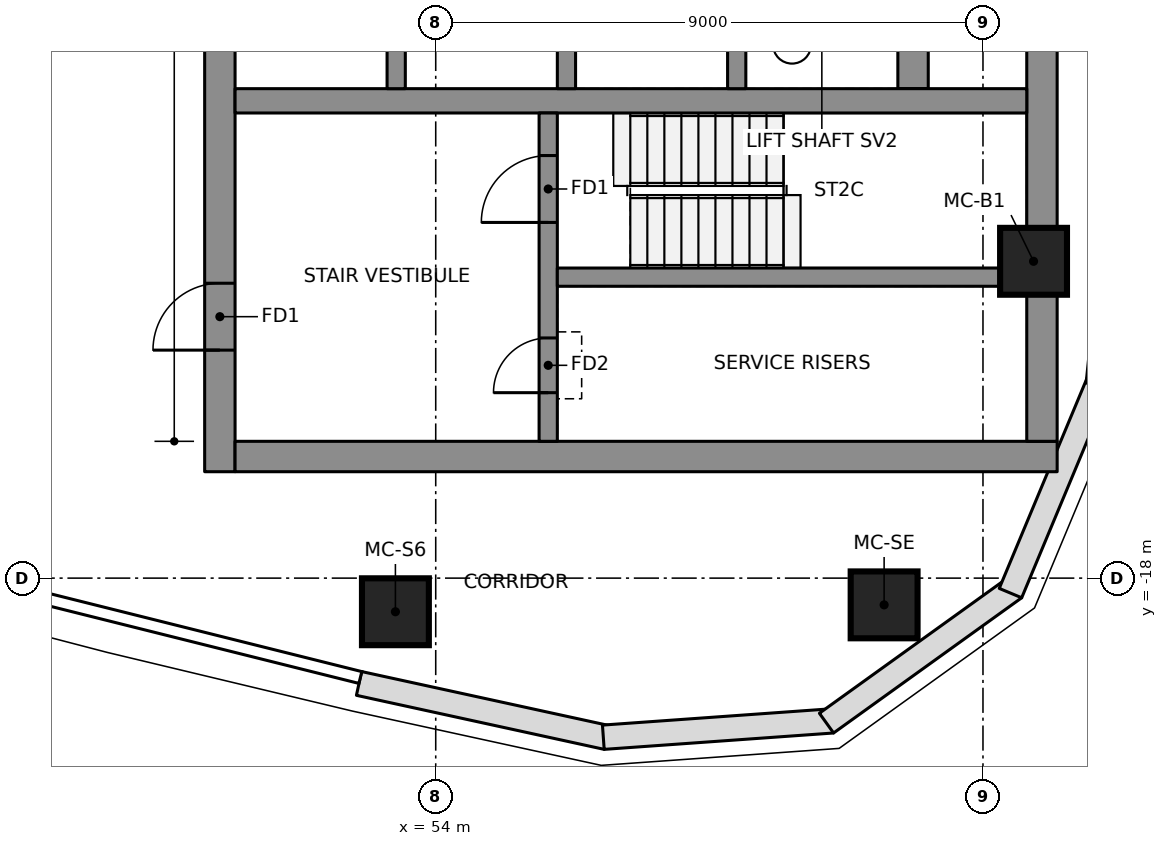
"""IFC4 building model, lengths in metres.
Left out: names, types, materials, properties, quantities, classifications, styles, units other than length and angle.
Written with IfcOpenShell. Run it as: python <this file> out.ifc"""

import sys

from ifc_helpers import new_model, si_unit, direction, frame, frame_2d, origin, origin_2d, place, context, subcontext, project, spatial, polyline, rectangle, outline, extrude, element, fill, save


model = new_model("IFC4")
c1 = context("Model", 3, precision=1e-05, world=origin(), true_north=direction((0.0, 1.0)))
c2 = subcontext(c1, "Body", "Model", "MODEL_VIEW")
j1 = project(units=[si_unit("LENGTHUNIT", "METRE"), si_unit("PLANEANGLEUNIT", "RADIAN")], contexts=[c1])
p1 = place(None, origin())
s1 = spatial("IfcSite", under=j1, at=p1, CompositionType="ELEMENT")
p2 = place(p1, origin())
s2 = spatial("IfcBuilding", under=s1, at=p2, CompositionType="ELEMENT")
p3 = place(p2, frame((0.0, 0.0, 282.1)))
s3 = spatial("IfcBuildingStorey", under=s2, at=p3, CompositionType="ELEMENT", Elevation=282.1)
p4 = place(p3, frame((50.45, -16.25, 0.0), z_axis=(0.0, 0.0, 1.0), x_axis=(0.0, 1.0, 0.0)))
e1 = element("IfcWall", 1, at=p4, inside=s3, PredefinedType="SHEAR", context=c2, shape_type="SweptSolid", body=[
    extrude(rectangle(XDim=9.6, YDim=0.5, at=frame_2d((4.8, 0.0))), origin(), (0.0, 0.0, 1.0), 3.55),
])
p5 = place(p4, frame((2.0, 0.0, 0.0)))
e2 = element("IfcOpeningElement", 2, at=p5, cuts=e1, PredefinedType="OPENING", context=c2, shape_type="SweptSolid", body=[
    extrude(rectangle(XDim=1.1, YDim=2.1, at=frame_2d((0.55, 1.05))), frame((0.0, 0.26, 0.0), z_axis=(0.0, -1.0, 0.0), x_axis=(1.0, 0.0, 0.0)), (0.0, 0.0, 1.0), 0.52),
])
p6 = place(p3, frame((50.7, -16.0, 0.0), z_axis=(0.0, 0.0, 1.0), x_axis=(1.0, 0.0, 0.0)))
e3 = element("IfcWall", 3, at=p6, inside=s3, PredefinedType="SHEAR", context=c2, shape_type="SweptSolid", body=[
    extrude(rectangle(XDim=13.52, YDim=0.5, at=frame_2d((6.76, 0.0))), origin(), (0.0, 0.0, 1.0), 3.55),
])
p7 = place(p3, frame((63.97, -15.75, 0.0), z_axis=(0.0, 0.0, 1.0), x_axis=(0.0, 1.0, 0.0)))
e4 = element("IfcWall", 4, at=p7, inside=s3, PredefinedType="SHEAR", context=c2, shape_type="SweptSolid", body=[
    extrude(rectangle(XDim=8.847, YDim=0.5, at=frame_2d((4.423, 0.0))), origin(), (0.0, 0.0, 1.0), 3.55),
])
p8 = place(p3, frame((61.85, -9.95, 0.0), z_axis=(0.0, 0.0, 1.0), x_axis=(0.0, 1.0, 0.0)))
e5 = element("IfcWall", 5, at=p8, inside=s3, PredefinedType="SHEAR", context=c2, shape_type="SweptSolid", body=[
    extrude(rectangle(XDim=19.9, YDim=0.5, at=frame_2d((9.95, 0.0))), origin(), (0.0, 0.0, 1.0), 3.55),
])
p9 = place(p3, frame((50.7, -10.15, 0.0), z_axis=(0.0, 0.0, 1.0), x_axis=(1.0, 0.0, 0.0)))
e6 = element("IfcWall", 6, at=p9, inside=s3, PredefinedType="SHEAR", context=c2, shape_type="SweptSolid", body=[
    extrude(rectangle(XDim=13.02, YDim=0.4, at=frame_2d((6.51, 0.0))), origin(), (0.0, 0.0, 1.0), 3.55),
])
for number, where, z_axis, x_axis in (
    (7, (53.35, -9.95, 0.0), (0.0, 0.0, 1.0), (0.0, 1.0, 0.0)),
    (8, (56.15, -9.95, 0.0), (0.0, 0.0, 1.0), (0.0, 1.0, 0.0)),
    (9, (58.95, -9.95, 0.0), (0.0, 0.0, 1.0), (0.0, 1.0, 0.0)),
):
    element("IfcWall", number, at=place(p3, frame(where, z_axis=z_axis, x_axis=x_axis)), inside=s3, PredefinedType="SHEAR", context=c2, shape_type="SweptSolid", body=[
        extrude(rectangle(XDim=3.0, YDim=0.3, at=frame_2d((1.5, 0.0))), origin(), (0.0, 0.0, 1.0), 3.55),
    ])
p10 = place(p3, frame((55.85, -15.75, 0.0), z_axis=(0.0, 0.0, 1.0), x_axis=(0.0, 1.0, 0.0)))
e10 = element("IfcWall", 10, at=p10, inside=s3, PredefinedType="SHEAR", context=c2, shape_type="SweptSolid", body=[
    extrude(rectangle(XDim=5.4, YDim=0.3, at=frame_2d((2.7, 0.0))), origin(), (0.0, 0.0, 1.0), 3.55),
])
p11 = place(p10, frame((3.6, 0.0, 0.0)))
e11 = element("IfcOpeningElement", 11, at=p11, cuts=e10, PredefinedType="OPENING", context=c2, shape_type="SweptSolid", body=[
    extrude(rectangle(XDim=1.1, YDim=2.1, at=frame_2d((0.55, 1.05))), frame((0.0, 0.16, 0.0), z_axis=(0.0, -1.0, 0.0), x_axis=(1.0, 0.0, 0.0)), (0.0, 0.0, 1.0), 0.32),
])
p12 = place(p10, frame((0.8, 0.0, 0.0)))
e12 = element("IfcOpeningElement", 12, at=p12, cuts=e10, PredefinedType="OPENING", context=c2, shape_type="SweptSolid", body=[
    extrude(rectangle(XDim=0.9, YDim=2.1, at=frame_2d((0.45, 1.05))), frame((0.0, 0.16, 0.0), z_axis=(0.0, -1.0, 0.0), x_axis=(1.0, 0.0, 0.0)), (0.0, 0.0, 1.0), 0.32),
])
p13 = place(p3, frame((56.0, -13.05, 0.0), z_axis=(0.0, 0.0, 1.0), x_axis=(1.0, 0.0, 0.0)))
e13 = element("IfcWall", 13, at=p13, inside=s3, PredefinedType="SHEAR", context=c2, shape_type="SweptSolid", body=[
    extrude(rectangle(XDim=7.72, YDim=0.3, at=frame_2d((3.86, 0.0))), origin(), (0.0, 0.0, 1.0), 3.55),
])
for number, where, z_axis, x_axis in (
    (14, (53.337, -18.553, 0.0), (0.0, 0.0, 1.0), (1.0, 0.0, 0.0)),
    (15, (61.374, -18.44, 0.0), (0.0, 0.0, 1.0), (1.0, 0.0, 0.0)),
    (16, (63.832, -12.789, 0.0), (0.0, 0.0, 1.0), (1.0, 0.0, 0.0)),
):
    element("IfcColumn", number, at=place(p3, frame(where, z_axis=z_axis, x_axis=x_axis)), inside=s3, PredefinedType="COLUMN", context=c2, shape_type="SweptSolid", body=[
        extrude(rectangle(XDim=1.1, YDim=1.1, at=origin_2d()), origin(), (0.0, 0.0, 1.0), 3.55),
    ])
p14 = place(p3, frame((52.738, -19.732, 0.0), z_axis=(0.0, 0.0, 1.0), x_axis=(0.977020225348, -0.213146614471, 0.0)))
e17 = element("IfcWall", 17, at=p14, inside=s3, PredefinedType="NOTDEFINED", context=c2, shape_type="SweptSolid", body=[
    extrude(outline(polyline([(0.0, -0.2), (4.171, -0.2), (4.113, 0.2), (0.0, 0.2), (0.0, -0.2)])), origin(), (0.0, 0.0, 1.0), 3.25),
])
p15 = place(p3, frame((56.785, -20.615, 0.0), z_axis=(0.0, 0.0, 1.0), x_axis=(0.99746272096, 0.071190731806, 0.0)))
e18 = element("IfcWall", 18, at=p15, inside=s3, PredefinedType="NOTDEFINED", context=c2, shape_type="SweptSolid", body=[
    extrude(outline(polyline([(-0.029, -0.2), (3.753, -0.2), (3.64, 0.2), (0.029, 0.2), (-0.029, -0.2)])), origin(), (0.0, 0.0, 1.0), 3.25),
])
p16 = place(p3, frame((60.472, -20.352, 0.0), z_axis=(0.0, 0.0, 1.0), x_axis=(0.811962548682, 0.583709533533, 0.0)))
e19 = element("IfcWall", 19, at=p16, inside=s3, PredefinedType="NOTDEFINED", context=c2, shape_type="SweptSolid", body=[
    extrude(outline(polyline([(-0.057, -0.2), (3.753, -0.2), (3.64, 0.2), (0.057, 0.2), (-0.057, -0.2)])), origin(), (0.0, 0.0, 1.0), 3.25),
])
p17 = place(p3, frame((63.474, -18.194, 0.0), z_axis=(0.0, 0.0, 1.0), x_axis=(0.385285857918, 0.922797273343, 0.0)))
e20 = element("IfcWall", 20, at=p17, inside=s3, PredefinedType="NOTDEFINED", context=c2, shape_type="SweptSolid", body=[
    extrude(outline(polyline([(-0.057, -0.2), (3.726, -0.2), (3.667, 0.2), (0.057, 0.2), (-0.057, -0.2)])), origin(), (0.0, 0.0, 1.0), 3.25),
])
p18 = place(p3, frame((64.898, -14.782, 0.0), z_axis=(0.0, 0.0, 1.0), x_axis=(0.102249826987, 0.994758751096, 0.0)))
e21 = element("IfcWall", 21, at=p18, inside=s3, PredefinedType="NOTDEFINED", context=c2, shape_type="SweptSolid", body=[
    extrude(outline(polyline([(-0.03, -0.2), (4.237, -0.2), (4.23, 0.2), (0.03, 0.2), (-0.03, -0.2)])), origin(), (0.0, 0.0, 1.0), 3.25),
])
p19 = place(p11, origin())
e22 = element("IfcDoor", 22, at=p19, inside=s3, OperationType="SINGLE_SWING_RIGHT", PredefinedType="DOOR", context=c2, shape_type="SweptSolid", body=[
    extrude(rectangle(XDim=1.1, YDim=2.1, at=frame_2d((0.55, 1.05))), frame((0.0, 0.025, 0.0), z_axis=(0.0, -1.0, 0.0), x_axis=(1.0, 0.0, 0.0)), (0.0, 0.0, 1.0), 0.05),
])
fill(e11, e22)
p20 = place(p5, origin())
e23 = element("IfcDoor", 23, at=p20, inside=s3, OperationType="SINGLE_SWING_RIGHT", PredefinedType="DOOR", context=c2, shape_type="SweptSolid", body=[
    extrude(rectangle(XDim=1.1, YDim=2.1, at=frame_2d((0.55, 1.05))), frame((0.0, 0.025, 0.0), z_axis=(0.0, -1.0, 0.0), x_axis=(1.0, 0.0, 0.0)), (0.0, 0.0, 1.0), 0.05),
])
fill(e2, e23)
p21 = place(p12, origin())
e24 = element("IfcDoor", 24, at=p21, inside=s3, OperationType="SINGLE_SWING_LEFT", PredefinedType="DOOR", context=c2, shape_type="SweptSolid", body=[
    extrude(rectangle(XDim=0.9, YDim=2.1, at=frame_2d((0.45, 1.05))), frame((0.0, 0.025, 0.0), z_axis=(0.0, -1.0, 0.0), x_axis=(1.0, 0.0, 0.0)), (0.0, 0.0, 1.0), 0.05),
])
fill(e12, e24)
save(model, sys.argv[1])
